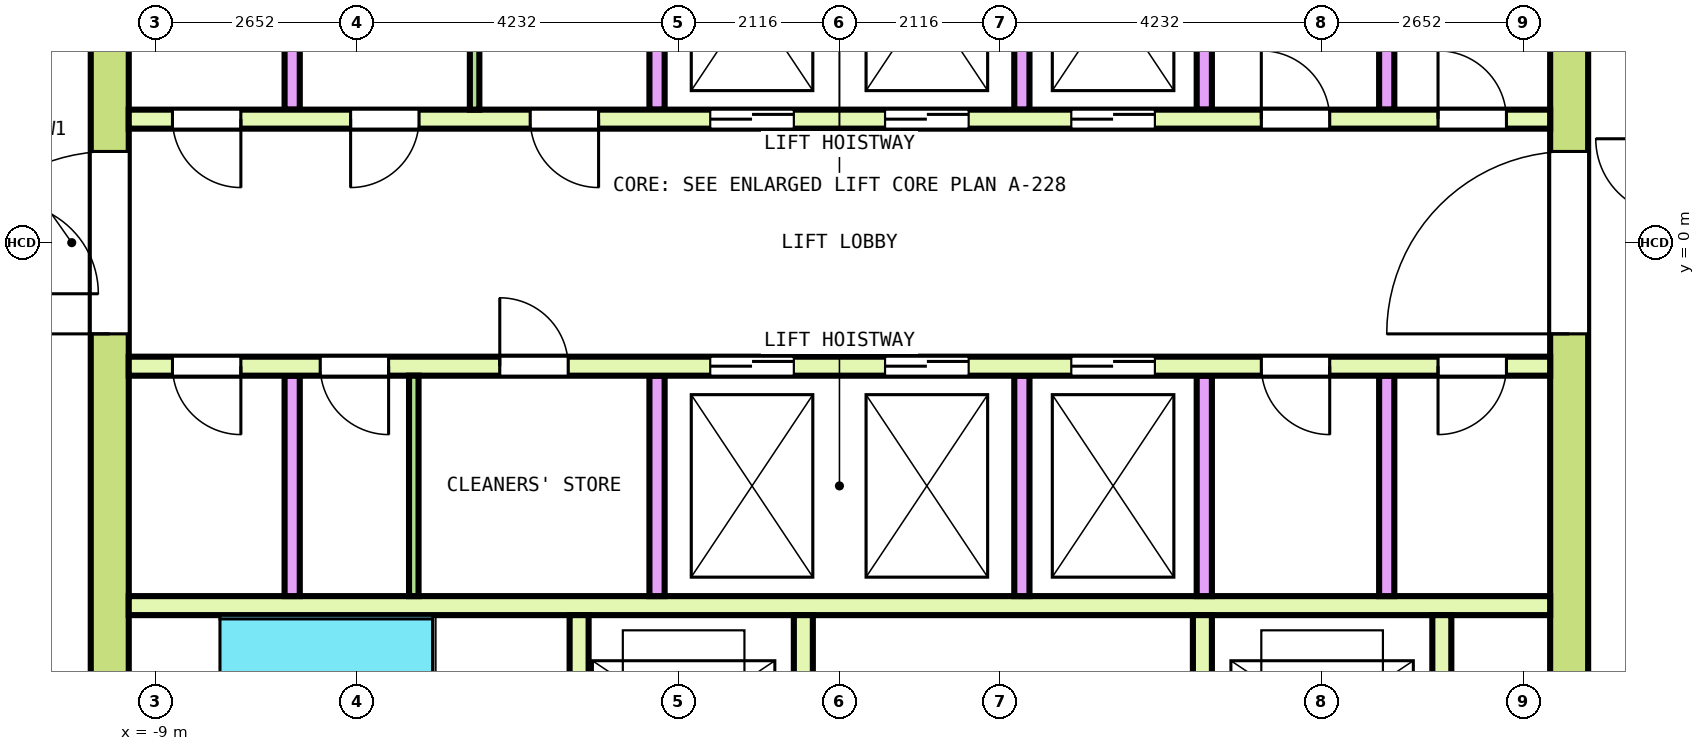
"""IFC4 building model, lengths in metres.
Left out: names, types, materials, properties, quantities, classifications, styles, units other than length and angle.
Written with IfcOpenShell. Run it as: python <this file> out.ifc"""

import sys

from ifc_helpers import new_model, si_unit, direction, frame, frame_2d, origin, place, context, subcontext, project, spatial, rectangle, extrude, element, fill, save


model = new_model("IFC4")
c1 = context("Model", 3, precision=1e-05, world=origin(), true_north=direction((0.0, 1.0)))
c2 = subcontext(c1, "Body", "Model", "MODEL_VIEW")
j1 = project(units=[si_unit("LENGTHUNIT", "METRE"), si_unit("PLANEANGLEUNIT", "RADIAN")], contexts=[c1])
p1 = place(None, origin())
s1 = spatial("IfcSite", under=j1, at=p1, CompositionType="ELEMENT")
p2 = place(p1, origin())
s2 = spatial("IfcBuilding", under=s1, at=p2, CompositionType="ELEMENT")
p3 = place(p2, frame((0.0, 0.0, 320.6)))
s3 = spatial("IfcBuildingStorey", under=s2, at=p3, CompositionType="ELEMENT", Elevation=320.6)
p4 = place(p3, frame((-9.6, -7.85, 0.0), z_axis=(0.0, 0.0, 1.0), x_axis=(0.0, 1.0, 0.0)))
e1 = element("IfcWall", 1, at=p4, inside=s3, PredefinedType="SHEAR", context=c2, shape_type="SweptSolid", body=[
    extrude(rectangle(XDim=15.7, YDim=0.5, at=frame_2d((7.85, 0.0))), origin(), (0.0, 0.0, 1.0), 3.7),
])
p5 = place(p4, frame((6.65, 0.0, 0.0)))
e2 = element("IfcOpeningElement", 2, at=p5, cuts=e1, PredefinedType="OPENING", context=c2, shape_type="SweptSolid", body=[
    extrude(rectangle(XDim=2.4, YDim=2.1, at=frame_2d((1.2, 1.05))), frame((0.0, 0.26, 0.0), z_axis=(0.0, -1.0, 0.0), x_axis=(1.0, 0.0, 0.0)), (0.0, 0.0, 1.0), 0.52),
])
p6 = place(p4, frame((13.55, 0.0, 0.0)))
e3 = element("IfcOpeningElement", 3, at=p6, cuts=e1, PredefinedType="OPENING", context=c2, shape_type="SweptSolid", body=[
    extrude(rectangle(XDim=1.2, YDim=2.1, at=frame_2d((0.6, 1.05))), frame((0.0, 0.26, 0.0), z_axis=(0.0, -1.0, 0.0), x_axis=(1.0, 0.0, 0.0)), (0.0, 0.0, 1.0), 0.52),
])
p7 = place(p4, frame((0.95, 0.0, 0.0)))
e4 = element("IfcOpeningElement", 4, at=p7, cuts=e1, PredefinedType="OPENING", context=c2, shape_type="SweptSolid", body=[
    extrude(rectangle(XDim=1.2, YDim=2.1, at=frame_2d((0.6, 1.05))), frame((0.0, 0.26, 0.0), z_axis=(0.0, -1.0, 0.0), x_axis=(1.0, 0.0, 0.0)), (0.0, 0.0, 1.0), 0.52),
])
p8 = place(p3, frame((9.6, -7.85, 0.0), z_axis=(0.0, 0.0, 1.0), x_axis=(0.0, 1.0, 0.0)))
e5 = element("IfcWall", 5, at=p8, inside=s3, PredefinedType="SHEAR", context=c2, shape_type="SweptSolid", body=[
    extrude(rectangle(XDim=15.7, YDim=0.5, at=frame_2d((7.85, 0.0))), origin(), (0.0, 0.0, 1.0), 3.7),
])
p9 = place(p8, frame((6.65, 0.0, 0.0)))
e6 = element("IfcOpeningElement", 6, at=p9, cuts=e5, PredefinedType="OPENING", context=c2, shape_type="SweptSolid", body=[
    extrude(rectangle(XDim=2.4, YDim=2.1, at=frame_2d((1.2, 1.05))), frame((0.0, 0.26, 0.0), z_axis=(0.0, -1.0, 0.0), x_axis=(1.0, 0.0, 0.0)), (0.0, 0.0, 1.0), 0.52),
])
p10 = place(p8, frame((13.55, 0.0, 0.0)))
e7 = element("IfcOpeningElement", 7, at=p10, cuts=e5, PredefinedType="OPENING", context=c2, shape_type="SweptSolid", body=[
    extrude(rectangle(XDim=1.2, YDim=2.1, at=frame_2d((0.6, 1.05))), frame((0.0, 0.26, 0.0), z_axis=(0.0, -1.0, 0.0), x_axis=(1.0, 0.0, 0.0)), (0.0, 0.0, 1.0), 0.52),
])
p11 = place(p8, frame((1.05, 0.0, 0.0)))
e8 = element("IfcOpeningElement", 8, at=p11, cuts=e5, PredefinedType="OPENING", context=c2, shape_type="SweptSolid", body=[
    extrude(rectangle(XDim=1.0, YDim=2.1, at=frame_2d((0.5, 1.05))), frame((0.0, 0.26, 0.0), z_axis=(0.0, -1.0, 0.0), x_axis=(1.0, 0.0, 0.0)), (0.0, 0.0, 1.0), 0.52),
])
p12 = place(p3, frame((-9.35, 1.625, 0.0), z_axis=(0.0, 0.0, 1.0), x_axis=(1.0, 0.0, 0.0)))
e9 = element("IfcWall", 9, at=p12, inside=s3, PredefinedType="SOLIDWALL", context=c2, shape_type="SweptSolid", body=[
    extrude(rectangle(XDim=18.7, YDim=0.25, at=frame_2d((9.35, 0.0))), origin(), (0.0, 0.0, 1.0), 3.7),
])
p13 = place(p12, frame((7.65, 0.0, 0.0)))
e10 = element("IfcOpeningElement", 10, at=p13, cuts=e9, PredefinedType="OPENING", context=c2, shape_type="SweptSolid", body=[
    extrude(rectangle(XDim=1.1, YDim=2.1, at=frame_2d((0.55, 1.05))), frame((0.0, 0.135, 0.0), z_axis=(0.0, -1.0, 0.0), x_axis=(1.0, 0.0, 0.0)), (0.0, 0.0, 1.0), 0.27),
])
p14 = place(p12, frame((9.95, 0.0, 0.0)))
e11 = element("IfcOpeningElement", 11, at=p14, cuts=e9, PredefinedType="OPENING", context=c2, shape_type="SweptSolid", body=[
    extrude(rectangle(XDim=1.1, YDim=2.1, at=frame_2d((0.55, 1.05))), frame((0.0, 0.135, 0.0), z_axis=(0.0, -1.0, 0.0), x_axis=(1.0, 0.0, 0.0)), (0.0, 0.0, 1.0), 0.27),
])
p15 = place(p12, frame((12.4, 0.0, 0.0)))
e12 = element("IfcOpeningElement", 12, at=p15, cuts=e9, PredefinedType="OPENING", context=c2, shape_type="SweptSolid", body=[
    extrude(rectangle(XDim=1.1, YDim=2.1, at=frame_2d((0.55, 1.05))), frame((0.0, 0.135, 0.0), z_axis=(0.0, -1.0, 0.0), x_axis=(1.0, 0.0, 0.0)), (0.0, 0.0, 1.0), 0.27),
])
p16 = place(p12, frame((0.575, 0.0, 0.0)))
e13 = element("IfcOpeningElement", 13, at=p16, cuts=e9, PredefinedType="OPENING", context=c2, shape_type="SweptSolid", body=[
    extrude(rectangle(XDim=0.9, YDim=2.1, at=frame_2d((0.45, 1.05))), frame((0.0, 0.135, 0.0), z_axis=(0.0, -1.0, 0.0), x_axis=(1.0, 0.0, 0.0)), (0.0, 0.0, 1.0), 0.27),
])
p17 = place(p12, frame((2.919, 0.0, 0.0)))
e14 = element("IfcOpeningElement", 14, at=p17, cuts=e9, PredefinedType="OPENING", context=c2, shape_type="SweptSolid", body=[
    extrude(rectangle(XDim=0.9, YDim=2.1, at=frame_2d((0.45, 1.05))), frame((0.0, 0.135, 0.0), z_axis=(0.0, -1.0, 0.0), x_axis=(1.0, 0.0, 0.0)), (0.0, 0.0, 1.0), 0.27),
])
p18 = place(p12, frame((5.281, 0.0, 0.0)))
e15 = element("IfcOpeningElement", 15, at=p18, cuts=e9, PredefinedType="OPENING", context=c2, shape_type="SweptSolid", body=[
    extrude(rectangle(XDim=0.9, YDim=2.1, at=frame_2d((0.45, 1.05))), frame((0.0, 0.135, 0.0), z_axis=(0.0, -1.0, 0.0), x_axis=(1.0, 0.0, 0.0)), (0.0, 0.0, 1.0), 0.27),
])
p19 = place(p12, frame((14.9, 0.0, 0.0)))
e16 = element("IfcOpeningElement", 16, at=p19, cuts=e9, PredefinedType="OPENING", context=c2, shape_type="SweptSolid", body=[
    extrude(rectangle(XDim=0.9, YDim=2.1, at=frame_2d((0.45, 1.05))), frame((0.0, 0.135, 0.0), z_axis=(0.0, -1.0, 0.0), x_axis=(1.0, 0.0, 0.0)), (0.0, 0.0, 1.0), 0.27),
])
p20 = place(p12, frame((17.225, 0.0, 0.0)))
e17 = element("IfcOpeningElement", 17, at=p20, cuts=e9, PredefinedType="OPENING", context=c2, shape_type="SweptSolid", body=[
    extrude(rectangle(XDim=0.9, YDim=2.1, at=frame_2d((0.45, 1.05))), frame((0.0, 0.135, 0.0), z_axis=(0.0, -1.0, 0.0), x_axis=(1.0, 0.0, 0.0)), (0.0, 0.0, 1.0), 0.27),
])
for number, where, z_axis, x_axis in (
    (18, (-7.2, 1.75, 0.0), (0.0, 0.0, 1.0), (0.0, 1.0, 0.0)),
    (19, (-2.4, 1.75, 0.0), (0.0, 0.0, 1.0), (0.0, 1.0, 0.0)),
    (20, (2.4, 1.75, 0.0), (0.0, 0.0, 1.0), (0.0, 1.0, 0.0)),
    (21, (4.8, 1.75, 0.0), (0.0, 0.0, 1.0), (0.0, 1.0, 0.0)),
    (22, (7.2, 1.75, 0.0), (0.0, 0.0, 1.0), (0.0, 1.0, 0.0)),
):
    element("IfcWall", number, at=place(p3, frame(where, z_axis=z_axis, x_axis=x_axis)), inside=s3, PredefinedType="SOLIDWALL", context=c2, shape_type="SweptSolid", body=[
        extrude(rectangle(XDim=2.9, YDim=0.2, at=frame_2d((1.45, 0.0))), origin(), (0.0, 0.0, 1.0), 3.7),
    ])
p21 = place(p3, frame((-9.35, -1.625, 0.0), z_axis=(0.0, 0.0, 1.0), x_axis=(1.0, 0.0, 0.0)))
e23 = element("IfcWall", 23, at=p21, inside=s3, PredefinedType="SOLIDWALL", context=c2, shape_type="SweptSolid", body=[
    extrude(rectangle(XDim=18.7, YDim=0.25, at=frame_2d((9.35, 0.0))), origin(), (0.0, 0.0, 1.0), 3.7),
])
p22 = place(p21, frame((7.65, 0.0, 0.0)))
e24 = element("IfcOpeningElement", 24, at=p22, cuts=e23, PredefinedType="OPENING", context=c2, shape_type="SweptSolid", body=[
    extrude(rectangle(XDim=1.1, YDim=2.1, at=frame_2d((0.55, 1.05))), frame((0.0, 0.135, 0.0), z_axis=(0.0, -1.0, 0.0), x_axis=(1.0, 0.0, 0.0)), (0.0, 0.0, 1.0), 0.27),
])
p23 = place(p21, frame((9.95, 0.0, 0.0)))
e25 = element("IfcOpeningElement", 25, at=p23, cuts=e23, PredefinedType="OPENING", context=c2, shape_type="SweptSolid", body=[
    extrude(rectangle(XDim=1.1, YDim=2.1, at=frame_2d((0.55, 1.05))), frame((0.0, 0.135, 0.0), z_axis=(0.0, -1.0, 0.0), x_axis=(1.0, 0.0, 0.0)), (0.0, 0.0, 1.0), 0.27),
])
p24 = place(p21, frame((12.4, 0.0, 0.0)))
e26 = element("IfcOpeningElement", 26, at=p24, cuts=e23, PredefinedType="OPENING", context=c2, shape_type="SweptSolid", body=[
    extrude(rectangle(XDim=1.1, YDim=2.1, at=frame_2d((0.55, 1.05))), frame((0.0, 0.135, 0.0), z_axis=(0.0, -1.0, 0.0), x_axis=(1.0, 0.0, 0.0)), (0.0, 0.0, 1.0), 0.27),
])
p25 = place(p21, frame((0.575, 0.0, 0.0)))
e27 = element("IfcOpeningElement", 27, at=p25, cuts=e23, PredefinedType="OPENING", context=c2, shape_type="SweptSolid", body=[
    extrude(rectangle(XDim=0.9, YDim=2.1, at=frame_2d((0.45, 1.05))), frame((0.0, 0.135, 0.0), z_axis=(0.0, -1.0, 0.0), x_axis=(1.0, 0.0, 0.0)), (0.0, 0.0, 1.0), 0.27),
])
p26 = place(p21, frame((2.519, 0.0, 0.0)))
e28 = element("IfcOpeningElement", 28, at=p26, cuts=e23, PredefinedType="OPENING", context=c2, shape_type="SweptSolid", body=[
    extrude(rectangle(XDim=0.9, YDim=2.1, at=frame_2d((0.45, 1.05))), frame((0.0, 0.135, 0.0), z_axis=(0.0, -1.0, 0.0), x_axis=(1.0, 0.0, 0.0)), (0.0, 0.0, 1.0), 0.27),
])
p27 = place(p21, frame((4.881, 0.0, 0.0)))
e29 = element("IfcOpeningElement", 29, at=p27, cuts=e23, PredefinedType="OPENING", context=c2, shape_type="SweptSolid", body=[
    extrude(rectangle(XDim=0.9, YDim=2.1, at=frame_2d((0.45, 1.05))), frame((0.0, 0.135, 0.0), z_axis=(0.0, -1.0, 0.0), x_axis=(1.0, 0.0, 0.0)), (0.0, 0.0, 1.0), 0.27),
])
p28 = place(p21, frame((14.9, 0.0, 0.0)))
e30 = element("IfcOpeningElement", 30, at=p28, cuts=e23, PredefinedType="OPENING", context=c2, shape_type="SweptSolid", body=[
    extrude(rectangle(XDim=0.9, YDim=2.1, at=frame_2d((0.45, 1.05))), frame((0.0, 0.135, 0.0), z_axis=(0.0, -1.0, 0.0), x_axis=(1.0, 0.0, 0.0)), (0.0, 0.0, 1.0), 0.27),
])
p29 = place(p21, frame((17.225, 0.0, 0.0)))
e31 = element("IfcOpeningElement", 31, at=p29, cuts=e23, PredefinedType="OPENING", context=c2, shape_type="SweptSolid", body=[
    extrude(rectangle(XDim=0.9, YDim=2.1, at=frame_2d((0.45, 1.05))), frame((0.0, 0.135, 0.0), z_axis=(0.0, -1.0, 0.0), x_axis=(1.0, 0.0, 0.0)), (0.0, 0.0, 1.0), 0.27),
])
p30 = place(p3, frame((-9.35, -4.775, 0.0), z_axis=(0.0, 0.0, 1.0), x_axis=(1.0, 0.0, 0.0)))
e32 = element("IfcWall", 32, at=p30, inside=s3, PredefinedType="SOLIDWALL", context=c2, shape_type="SweptSolid", body=[
    extrude(rectangle(XDim=18.7, YDim=0.25, at=frame_2d((9.35, 0.0))), origin(), (0.0, 0.0, 1.0), 3.7),
])
for number, where, z_axis, x_axis in (
    (33, (-7.2, -4.65, 0.0), (0.0, 0.0, 1.0), (0.0, 1.0, 0.0)),
    (34, (-2.4, -4.65, 0.0), (0.0, 0.0, 1.0), (0.0, 1.0, 0.0)),
    (35, (2.4, -4.65, 0.0), (0.0, 0.0, 1.0), (0.0, 1.0, 0.0)),
    (36, (4.8, -4.65, 0.0), (0.0, 0.0, 1.0), (0.0, 1.0, 0.0)),
    (37, (7.2, -4.65, 0.0), (0.0, 0.0, 1.0), (0.0, 1.0, 0.0)),
):
    element("IfcWall", number, at=place(p3, frame(where, z_axis=z_axis, x_axis=x_axis)), inside=s3, PredefinedType="SOLIDWALL", context=c2, shape_type="SweptSolid", body=[
        extrude(rectangle(XDim=2.9, YDim=0.2, at=frame_2d((1.45, 0.0))), origin(), (0.0, 0.0, 1.0), 3.7),
    ])
p31 = place(p3, frame((-3.425, -7.85, 0.0), z_axis=(0.0, 0.0, 1.0), x_axis=(0.0, 1.0, 0.0)))
e38 = element("IfcWall", 38, at=p31, inside=s3, PredefinedType="SOLIDWALL", context=c2, shape_type="SweptSolid", body=[
    extrude(rectangle(XDim=2.95, YDim=0.25, at=frame_2d((1.475, 0.0))), origin(), (0.0, 0.0, 1.0), 3.7),
])
p32 = place(p3, frame((-0.475, -7.85, 0.0), z_axis=(0.0, 0.0, 1.0), x_axis=(0.0, 1.0, 0.0)))
e39 = element("IfcWall", 39, at=p32, inside=s3, PredefinedType="SOLIDWALL", context=c2, shape_type="SweptSolid", body=[
    extrude(rectangle(XDim=2.95, YDim=0.25, at=frame_2d((1.475, 0.0))), origin(), (0.0, 0.0, 1.0), 3.7),
])
p33 = place(p32, frame((0.925, 0.0, 0.0)))
e40 = element("IfcOpeningElement", 40, at=p33, cuts=e39, PredefinedType="OPENING", context=c2, shape_type="SweptSolid", body=[
    extrude(rectangle(XDim=1.1, YDim=2.1, at=frame_2d((0.55, 1.05))), frame((0.0, 0.135, 0.0), z_axis=(0.0, -1.0, 0.0), x_axis=(1.0, 0.0, 0.0)), (0.0, 0.0, 1.0), 0.27),
])
p34 = place(p3, frame((4.775, -7.85, 0.0), z_axis=(0.0, 0.0, 1.0), x_axis=(0.0, 1.0, 0.0)))
e41 = element("IfcWall", 41, at=p34, inside=s3, PredefinedType="SOLIDWALL", context=c2, shape_type="SweptSolid", body=[
    extrude(rectangle(XDim=2.95, YDim=0.25, at=frame_2d((1.475, 0.0))), origin(), (0.0, 0.0, 1.0), 3.7),
])
p35 = place(p34, frame((0.925, 0.0, 0.0)))
e42 = element("IfcOpeningElement", 42, at=p35, cuts=e41, PredefinedType="OPENING", context=c2, shape_type="SweptSolid", body=[
    extrude(rectangle(XDim=1.1, YDim=2.1, at=frame_2d((0.55, 1.05))), frame((0.0, 0.135, 0.0), z_axis=(0.0, -1.0, 0.0), x_axis=(1.0, 0.0, 0.0)), (0.0, 0.0, 1.0), 0.27),
])
p36 = place(p3, frame((7.925, -7.85, 0.0), z_axis=(0.0, 0.0, 1.0), x_axis=(0.0, 1.0, 0.0)))
e43 = element("IfcWall", 43, at=p36, inside=s3, PredefinedType="SOLIDWALL", context=c2, shape_type="SweptSolid", body=[
    extrude(rectangle(XDim=2.95, YDim=0.25, at=frame_2d((1.475, 0.0))), origin(), (0.0, 0.0, 1.0), 3.7),
])
for number, where, z_axis, x_axis in (
    (44, (-4.8, 1.75, 0.0), (0.0, 0.0, 1.0), (0.0, 1.0, 0.0)),
    (45, (-5.6, -4.65, 0.0), (0.0, 0.0, 1.0), (0.0, 1.0, 0.0)),
):
    element("IfcWall", number, at=place(p3, frame(where, z_axis=z_axis, x_axis=x_axis)), inside=s3, PredefinedType="PARTITIONING", context=c2, shape_type="SweptSolid", body=[
        extrude(rectangle(XDim=2.9, YDim=0.125, at=frame_2d((1.45, 0.0))), origin(), (0.0, 0.0, 1.0), 3.7),
    ])
p37 = place(p13, origin())
e46 = element("IfcDoor", 46, at=p37, inside=s3, OperationType="DOUBLE_DOOR_SLIDING", PredefinedType="DOOR", context=c2, shape_type="SweptSolid", body=[
    extrude(rectangle(XDim=1.1, YDim=2.1, at=frame_2d((0.55, 1.05))), frame((0.0, 0.075, 0.0), z_axis=(0.0, -1.0, 0.0), x_axis=(1.0, 0.0, 0.0)), (0.0, 0.0, 1.0), 0.15),
])
fill(e10, e46)
p38 = place(p14, origin())
e47 = element("IfcDoor", 47, at=p38, inside=s3, OperationType="DOUBLE_DOOR_SLIDING", PredefinedType="DOOR", context=c2, shape_type="SweptSolid", body=[
    extrude(rectangle(XDim=1.1, YDim=2.1, at=frame_2d((0.55, 1.05))), frame((0.0, 0.075, 0.0), z_axis=(0.0, -1.0, 0.0), x_axis=(1.0, 0.0, 0.0)), (0.0, 0.0, 1.0), 0.15),
])
fill(e11, e47)
p39 = place(p15, origin())
e48 = element("IfcDoor", 48, at=p39, inside=s3, OperationType="DOUBLE_DOOR_SLIDING", PredefinedType="DOOR", context=c2, shape_type="SweptSolid", body=[
    extrude(rectangle(XDim=1.1, YDim=2.1, at=frame_2d((0.55, 1.05))), frame((0.0, 0.075, 0.0), z_axis=(0.0, -1.0, 0.0), x_axis=(1.0, 0.0, 0.0)), (0.0, 0.0, 1.0), 0.15),
])
fill(e12, e48)
p40 = place(p22, origin())
e49 = element("IfcDoor", 49, at=p40, inside=s3, OperationType="DOUBLE_DOOR_SLIDING", PredefinedType="DOOR", context=c2, shape_type="SweptSolid", body=[
    extrude(rectangle(XDim=1.1, YDim=2.1, at=frame_2d((0.55, 1.05))), frame((0.0, 0.075, 0.0), z_axis=(0.0, -1.0, 0.0), x_axis=(1.0, 0.0, 0.0)), (0.0, 0.0, 1.0), 0.15),
])
fill(e24, e49)
p41 = place(p23, origin())
e50 = element("IfcDoor", 50, at=p41, inside=s3, OperationType="DOUBLE_DOOR_SLIDING", PredefinedType="DOOR", context=c2, shape_type="SweptSolid", body=[
    extrude(rectangle(XDim=1.1, YDim=2.1, at=frame_2d((0.55, 1.05))), frame((0.0, 0.075, 0.0), z_axis=(0.0, -1.0, 0.0), x_axis=(1.0, 0.0, 0.0)), (0.0, 0.0, 1.0), 0.15),
])
fill(e25, e50)
p42 = place(p24, origin())
e51 = element("IfcDoor", 51, at=p42, inside=s3, OperationType="DOUBLE_DOOR_SLIDING", PredefinedType="DOOR", context=c2, shape_type="SweptSolid", body=[
    extrude(rectangle(XDim=1.1, YDim=2.1, at=frame_2d((0.55, 1.05))), frame((0.0, 0.075, 0.0), z_axis=(0.0, -1.0, 0.0), x_axis=(1.0, 0.0, 0.0)), (0.0, 0.0, 1.0), 0.15),
])
fill(e26, e51)
p43 = place(p5, origin())
e52 = element("IfcDoor", 52, at=p43, inside=s3, OperationType="DOUBLE_DOOR_SINGLE_SWING", PredefinedType="DOOR", context=c2, shape_type="SweptSolid", body=[
    extrude(rectangle(XDim=2.4, YDim=2.1, at=frame_2d((1.2, 1.05))), frame((0.0, 0.2, 0.0), z_axis=(0.0, -1.0, 0.0), x_axis=(1.0, 0.0, 0.0)), (0.0, 0.0, 1.0), 0.4),
])
fill(e2, e52)
p44 = place(p9, origin())
e53 = element("IfcDoor", 53, at=p44, inside=s3, OperationType="DOUBLE_DOOR_SINGLE_SWING", PredefinedType="DOOR", context=c2, shape_type="SweptSolid", body=[
    extrude(rectangle(XDim=2.4, YDim=2.1, at=frame_2d((1.2, 1.05))), frame((0.0, 0.2, 0.0), z_axis=(0.0, -1.0, 0.0), x_axis=(1.0, 0.0, 0.0)), (0.0, 0.0, 1.0), 0.4),
])
fill(e6, e53)
p45 = place(p16, origin())
e54 = element("IfcDoor", 54, at=p45, inside=s3, OperationType="SINGLE_SWING_RIGHT", PredefinedType="DOOR", context=c2, shape_type="SweptSolid", body=[
    extrude(rectangle(XDim=0.9, YDim=2.1, at=frame_2d((0.45, 1.05))), frame((0.0, 0.075, 0.0), z_axis=(0.0, -1.0, 0.0), x_axis=(1.0, 0.0, 0.0)), (0.0, 0.0, 1.0), 0.15),
])
fill(e13, e54)
p46 = place(p17, origin())
e55 = element("IfcDoor", 55, at=p46, inside=s3, OperationType="SINGLE_SWING_LEFT", PredefinedType="DOOR", context=c2, shape_type="SweptSolid", body=[
    extrude(rectangle(XDim=0.9, YDim=2.1, at=frame_2d((0.45, 1.05))), frame((0.0, 0.075, 0.0), z_axis=(0.0, -1.0, 0.0), x_axis=(1.0, 0.0, 0.0)), (0.0, 0.0, 1.0), 0.15),
])
fill(e14, e55)
p47 = place(p18, origin())
e56 = element("IfcDoor", 56, at=p47, inside=s3, OperationType="SINGLE_SWING_RIGHT", PredefinedType="DOOR", context=c2, shape_type="SweptSolid", body=[
    extrude(rectangle(XDim=0.9, YDim=2.1, at=frame_2d((0.45, 1.05))), frame((0.0, 0.075, 0.0), z_axis=(0.0, -1.0, 0.0), x_axis=(1.0, 0.0, 0.0)), (0.0, 0.0, 1.0), 0.15),
])
fill(e15, e56)
p48 = place(p19, origin())
e57 = element("IfcDoor", 57, at=p48, inside=s3, OperationType="SINGLE_SWING_LEFT", PredefinedType="DOOR", context=c2, shape_type="SweptSolid", body=[
    extrude(rectangle(XDim=0.9, YDim=2.1, at=frame_2d((0.45, 1.05))), frame((0.0, 0.075, 0.0), z_axis=(0.0, -1.0, 0.0), x_axis=(1.0, 0.0, 0.0)), (0.0, 0.0, 1.0), 0.15),
])
fill(e16, e57)
p49 = place(p20, origin())
e58 = element("IfcDoor", 58, at=p49, inside=s3, OperationType="SINGLE_SWING_RIGHT", PredefinedType="DOOR", context=c2, shape_type="SweptSolid", body=[
    extrude(rectangle(XDim=0.9, YDim=2.1, at=frame_2d((0.45, 1.05))), frame((0.0, 0.075, 0.0), z_axis=(0.0, -1.0, 0.0), x_axis=(1.0, 0.0, 0.0)), (0.0, 0.0, 1.0), 0.15),
])
fill(e17, e58)
p50 = place(p25, origin())
e59 = element("IfcDoor", 59, at=p50, inside=s3, OperationType="SINGLE_SWING_LEFT", PredefinedType="DOOR", context=c2, shape_type="SweptSolid", body=[
    extrude(rectangle(XDim=0.9, YDim=2.1, at=frame_2d((0.45, 1.05))), frame((0.0, 0.075, 0.0), z_axis=(0.0, -1.0, 0.0), x_axis=(1.0, 0.0, 0.0)), (0.0, 0.0, 1.0), 0.15),
])
fill(e27, e59)
p51 = place(p26, origin())
e60 = element("IfcDoor", 60, at=p51, inside=s3, OperationType="SINGLE_SWING_RIGHT", PredefinedType="DOOR", context=c2, shape_type="SweptSolid", body=[
    extrude(rectangle(XDim=0.9, YDim=2.1, at=frame_2d((0.45, 1.05))), frame((0.0, 0.075, 0.0), z_axis=(0.0, -1.0, 0.0), x_axis=(1.0, 0.0, 0.0)), (0.0, 0.0, 1.0), 0.15),
])
fill(e28, e60)
p52 = place(p27, origin())
e61 = element("IfcDoor", 61, at=p52, inside=s3, OperationType="SINGLE_SWING_LEFT", PredefinedType="DOOR", context=c2, shape_type="SweptSolid", body=[
    extrude(rectangle(XDim=0.9, YDim=2.1, at=frame_2d((0.45, 1.05))), frame((0.0, 0.075, 0.0), z_axis=(0.0, -1.0, 0.0), x_axis=(1.0, 0.0, 0.0)), (0.0, 0.0, 1.0), 0.15),
])
fill(e29, e61)
p53 = place(p28, origin())
e62 = element("IfcDoor", 62, at=p53, inside=s3, OperationType="SINGLE_SWING_RIGHT", PredefinedType="DOOR", context=c2, shape_type="SweptSolid", body=[
    extrude(rectangle(XDim=0.9, YDim=2.1, at=frame_2d((0.45, 1.05))), frame((0.0, 0.075, 0.0), z_axis=(0.0, -1.0, 0.0), x_axis=(1.0, 0.0, 0.0)), (0.0, 0.0, 1.0), 0.15),
])
fill(e30, e62)
p54 = place(p29, origin())
e63 = element("IfcDoor", 63, at=p54, inside=s3, OperationType="SINGLE_SWING_LEFT", PredefinedType="DOOR", context=c2, shape_type="SweptSolid", body=[
    extrude(rectangle(XDim=0.9, YDim=2.1, at=frame_2d((0.45, 1.05))), frame((0.0, 0.075, 0.0), z_axis=(0.0, -1.0, 0.0), x_axis=(1.0, 0.0, 0.0)), (0.0, 0.0, 1.0), 0.15),
])
fill(e31, e63)
save(model, sys.argv[1])
